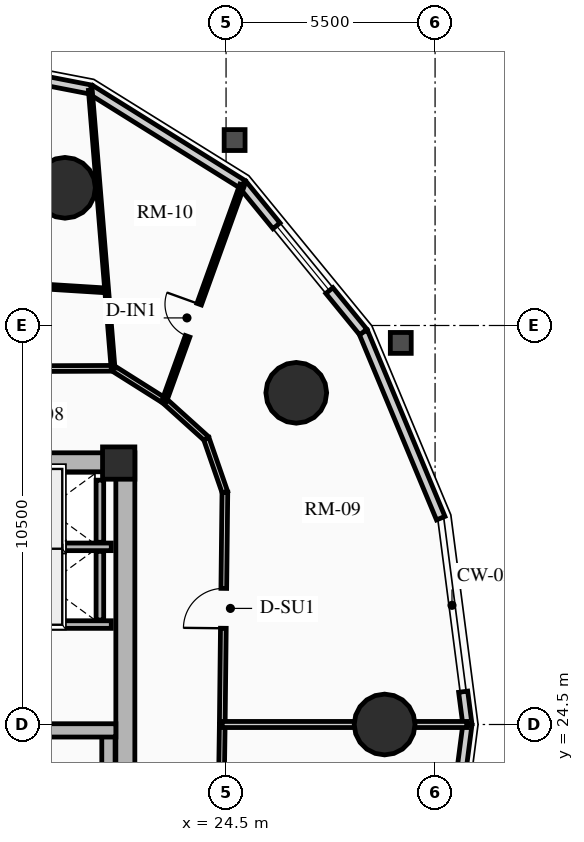
"""IFC4 building model, lengths in metres.
Left out: names, types, materials, properties, quantities, classifications, styles, units other than length and angle.
Written with IfcOpenShell. Run it as: python <this file> out.ifc"""

import sys

from ifc_helpers import new_model, si_unit, direction, frame, frame_2d, origin, origin_2d, place, context, subcontext, project, spatial, rectangle, circle, extrude, source, transform, mapped, element, fill, save


model = new_model("IFC4")
c1 = context("Model", 3, precision=1e-05, world=origin(), true_north=direction((0.0, 1.0)))
c2 = subcontext(c1, "Body", "Model", "MODEL_VIEW")
j1 = project(units=[si_unit("LENGTHUNIT", "METRE"), si_unit("PLANEANGLEUNIT", "RADIAN")], contexts=[c1])
p1 = place(None, origin())
s1 = spatial("IfcSite", under=j1, at=p1, CompositionType="ELEMENT")
p2 = place(p1, origin())
s2 = spatial("IfcBuilding", under=s1, at=p2, CompositionType="ELEMENT")
p3 = place(p2, frame((0.0, 0.0, 27.82)))
s3 = spatial("IfcBuildingStorey", under=s2, at=p3, CompositionType="ELEMENT", Elevation=27.82)
p4 = place(p3, frame((21.85, 17.35, 0.0), z_axis=(0.0, 0.0, 1.0), x_axis=(0.0, 1.0, 0.0)))
e1 = element("IfcWall", 1, at=p4, inside=s3, PredefinedType="SHEAR", context=c2, shape_type="SweptSolid", body=[
    extrude(rectangle(XDim=14.3, YDim=0.5, at=frame_2d((7.15, 0.0))), origin(), (0.0, 0.0, 1.0), 2.91),
])
p5 = place(p3, frame((11.15, 31.4, 0.0), z_axis=(0.0, 0.0, 1.0), x_axis=(1.0, 0.0, 0.0)))
e2 = element("IfcWall", 2, at=p5, inside=s3, PredefinedType="SHEAR", context=c2, shape_type="SweptSolid", body=[
    extrude(rectangle(XDim=10.7, YDim=0.5, at=frame_2d((5.35, 0.0))), origin(), (0.0, 0.0, 1.0), 2.91),
])
m1 = source(origin(), c2, "Body", "SweptSolid", [
    extrude(rectangle(XDim=1.5, YDim=2.02, at=frame_2d((0.75, 1.01))), frame((0.0, 0.26, 0.0), z_axis=(0.0, -1.0, 0.0), x_axis=(1.0, 0.0, 0.0)), (0.0, 0.0, 1.0), 0.52),
])
p6 = place(p5, frame((4.6, 0.0, 0.0)))
e3 = element("IfcOpeningElement", 3, at=p6, cuts=e2, PredefinedType="OPENING", context=c2, shape_type="MappedRepresentation", body=[
    mapped(m1, transform((0.0, 0.0, 0.0), x_axis=(1.0, 0.0, 0.0), y_axis=(0.0, 1.0, 0.0), z_axis=(0.0, 0.0, 1.0), scale=1.0)),
])
p7 = place(p3, frame((21.405, 17.6, 0.0), z_axis=(0.0, 0.0, 1.0), x_axis=(0.0, 1.0, 0.0)))
e4 = element("IfcWall", 4, at=p7, inside=s3, PredefinedType="SHEAR", context=c2, shape_type="SweptSolid", body=[
    extrude(rectangle(XDim=6.745, YDim=0.35, at=frame_2d((3.373, 0.0))), origin(), (0.0, 0.0, 1.0), 2.91),
])
p8 = place(p3, frame((18.315, 24.345, 0.0), z_axis=(0.0, 0.0, 1.0), x_axis=(1.0, 0.0, 0.0)))
e5 = element("IfcWall", 5, at=p8, inside=s3, PredefinedType="SHEAR", context=c2, shape_type="SweptSolid", body=[
    extrude(rectangle(XDim=3.285, YDim=0.35, at=frame_2d((1.643, 0.0))), origin(), (0.0, 0.0, 1.0), 2.91),
])
p9 = place(p3, frame((21.675, 31.38, 0.0), z_axis=(0.0, 0.0, 1.0), x_axis=(1.0, 0.0, 0.0)))
e6 = element("IfcColumn", 6, at=p9, inside=s3, PredefinedType="COLUMN", context=c2, shape_type="SweptSolid", body=[
    extrude(rectangle(XDim=0.85, YDim=0.85, at=origin_2d()), origin(), (0.0, 0.0, 1.0), 2.91),
])
for number, where, z_axis, x_axis in (
    (7, (28.672, 24.5, 0.0), (0.0, 0.0, 1.0), (1.0, 0.0, 0.0)),
    (8, (26.347, 33.229, 0.0), (0.0, 0.0, 1.0), (1.0, 0.0, 0.0)),
    (9, (20.261, 38.623, 0.0), (0.0, 0.0, 1.0), (1.0, 0.0, 0.0)),
):
    element("IfcColumn", number, at=place(p3, frame(where, z_axis=z_axis, x_axis=x_axis)), inside=s3, PredefinedType="USERDEFINED", context=c2, shape_type="SweptSolid", body=[
        extrude(circle(Radius=0.8, at=origin_2d()), origin(), (0.0, 0.0, 1.0), 2.91),
    ])
p10 = place(p3, frame((30.739, 25.363, 0.0), z_axis=(0.0, 0.0, 1.0), x_axis=(0.128523364007, -0.991706481225, 0.0)))
e10 = element("IfcWall", 10, at=p10, inside=s3, PredefinedType="SOLIDWALL", context=c2, shape_type="SweptSolid", body=[
    extrude(rectangle(XDim=0.87, YDim=0.24, at=frame_2d((0.435, 0.0))), origin(), (0.0, 0.0, 1.0), 2.073),
])
p11 = place(p3, frame((28.11, 34.827, 0.0), z_axis=(0.0, 0.0, 1.0), x_axis=(0.384255919668, -0.923226618009, 0.0)))
e11 = element("IfcWall", 11, at=p11, inside=s3, PredefinedType="SOLIDWALL", context=c2, shape_type="SweptSolid", body=[
    extrude(rectangle(XDim=5.305, YDim=0.24, at=frame_2d((2.653, 0.0))), origin(), (0.0, 0.0, 1.0), 2.635),
])
p12 = place(p3, frame((24.935, 38.714, 0.0), z_axis=(0.0, 0.0, 1.0), x_axis=(0.632588557044, -0.774488035735, 0.0)))
e12 = element("IfcWall", 12, at=p12, inside=s3, PredefinedType="SOLIDWALL", context=c2, shape_type="SweptSolid", body=[
    extrude(rectangle(XDim=5.019, YDim=0.24, at=frame_2d((2.509, 0.0))), origin(), (0.0, 0.0, 1.0), 2.635),
])
m2 = source(origin(), c2, "Body", "SweptSolid", [
    extrude(rectangle(XDim=2.2, YDim=1.35, at=frame_2d((1.1, 0.675))), frame((0.0, 0.13, 0.0), z_axis=(0.0, -1.0, 0.0), x_axis=(1.0, 0.0, 0.0)), (0.0, 0.0, 1.0), 0.26),
])
p13 = place(p12, frame((1.409, 0.0, 0.65)))
e13 = element("IfcOpeningElement", 13, at=p13, cuts=e12, PredefinedType="OPENING", context=c2, shape_type="MappedRepresentation", body=[
    mapped(m2, transform((0.0, 0.0, 0.0), x_axis=(1.0, 0.0, 0.0), y_axis=(0.0, 1.0, 0.0), z_axis=(0.0, 0.0, 1.0), scale=1.0)),
])
p14 = place(p3, frame((20.935, 41.21, 0.0), z_axis=(0.0, 0.0, 1.0), x_axis=(0.848422721916, -0.529319265601, 0.0)))
e14 = element("IfcWall", 14, at=p14, inside=s3, PredefinedType="SOLIDWALL", context=c2, shape_type="SweptSolid", body=[
    extrude(rectangle(XDim=4.715, YDim=0.24, at=frame_2d((2.357, 0.0))), origin(), (0.0, 0.0, 1.0), 2.635),
])
p15 = place(p3, frame((16.5, 42.07, 0.0), z_axis=(0.0, 0.0, 1.0), x_axis=(0.981717351035, -0.190344536766, 0.0)))
e15 = element("IfcWall", 15, at=p15, inside=s3, PredefinedType="SOLIDWALL", context=c2, shape_type="SweptSolid", body=[
    extrude(rectangle(XDim=4.517, YDim=0.24, at=frame_2d((2.259, 0.0))), origin(), (0.0, 0.0, 1.0), 2.635),
])
m3 = source(origin(), c2, "Body", "SweptSolid", [
    extrude(rectangle(XDim=1.9, YDim=1.35, at=frame_2d((0.95, 0.675))), frame((0.0, 0.13, 0.0), z_axis=(0.0, -1.0, 0.0), x_axis=(1.0, 0.0, 0.0)), (0.0, 0.0, 1.0), 0.26),
])
p16 = place(p15, frame((1.309, 0.0, 0.65)))
e16 = element("IfcOpeningElement", 16, at=p16, cuts=e15, PredefinedType="OPENING", context=c2, shape_type="MappedRepresentation", body=[
    mapped(m3, transform((0.0, 0.0, 0.0), x_axis=(1.0, 0.0, 0.0), y_axis=(0.0, 1.0, 0.0), z_axis=(0.0, 0.0, 1.0), scale=1.0)),
])
p17 = place(p3, frame((30.851, 24.5, 0.0), z_axis=(0.0, 0.0, 1.0), x_axis=(-0.128298189174, -0.991735637483, 0.0)))
e17 = element("IfcWall", 17, at=p17, inside=s3, PredefinedType="SOLIDWALL", context=c2, shape_type="SweptSolid", body=[
    extrude(rectangle(XDim=5.475, YDim=0.24, at=frame_2d((2.737, 0.0))), origin(), (0.0, 0.0, 1.0), 2.073),
])
p18 = place(p17, frame((1.787, 0.0, 0.65)))
e18 = element("IfcOpeningElement", 18, at=p18, cuts=e17, PredefinedType="OPENING", context=c2, shape_type="MappedRepresentation", body=[
    mapped(m3, transform((0.0, 0.0, 0.0), x_axis=(1.0, 0.0, 0.0), y_axis=(0.0, 1.0, 0.0), z_axis=(0.0, 0.0, 1.0), scale=1.0)),
])
for number, where, z_axis, x_axis in (
    (19, (18.51, 27.13, 0.0), (0.0, 0.0, 1.0), (1.0, 0.0, 0.0)),
    (20, (18.51, 29.175, 0.0), (0.0, 0.0, 1.0), (1.0, 0.0, 0.0)),
):
    element("IfcWall", number, at=place(p3, frame(where, z_axis=z_axis, x_axis=x_axis)), inside=s3, PredefinedType="SHEAR", context=c2, shape_type="SweptSolid", body=[
        extrude(rectangle(XDim=2.97, YDim=0.2, at=frame_2d((1.485, 0.0))), origin(), (0.0, 0.0, 1.0), 2.91),
    ])
p19 = place(p3, frame((21.18, 27.25, 0.0), z_axis=(0.0, 0.0, 1.0), x_axis=(0.0, 1.0, 0.0)))
e21 = element("IfcWall", 21, at=p19, inside=s3, PredefinedType="SHEAR", context=c2, shape_type="SweptSolid", body=[
    extrude(rectangle(XDim=1.805, YDim=0.2, at=frame_2d((0.902, 0.0))), origin(), (0.0, 0.0, 1.0), 2.91),
])
p20 = place(p3, frame((21.18, 29.295, 0.0), z_axis=(0.0, 0.0, 1.0), x_axis=(0.0, 1.0, 0.0)))
e22 = element("IfcWall", 22, at=p20, inside=s3, PredefinedType="SHEAR", context=c2, shape_type="SweptSolid", body=[
    extrude(rectangle(XDim=1.635, YDim=0.2, at=frame_2d((0.817, 0.0))), origin(), (0.0, 0.0, 1.0), 2.91),
])
p21 = place(p3, frame((24.4, 24.5, 0.0), z_axis=(0.0, 0.0, 1.0), x_axis=(0.011299841544, 0.999936154752, 0.0)))
e23 = element("IfcWall", 23, at=p21, inside=s3, PredefinedType="PARTITIONING", context=c2, shape_type="SweptSolid", body=[
    extrude(rectangle(XDim=6.115, YDim=0.15, at=frame_2d((3.057, 0.0))), origin(), (0.0, 0.0, 1.0), 2.159),
])
m4 = source(origin(), c2, "Body", "SweptSolid", [
    extrude(rectangle(XDim=1.05, YDim=2.015, at=frame_2d((0.525, 1.007))), frame((0.0, 0.085, 0.0), z_axis=(0.0, -1.0, 0.0), x_axis=(1.0, 0.0, 0.0)), (0.0, 0.0, 1.0), 0.17),
])
p22 = place(p21, frame((2.532, 0.0, 0.0)))
e24 = element("IfcOpeningElement", 24, at=p22, cuts=e23, PredefinedType="OPENING", context=c2, shape_type="MappedRepresentation", body=[
    mapped(m4, transform((0.0, 0.0, 0.0), x_axis=(1.0, 0.0, 0.0), y_axis=(0.0, 1.0, 0.0), z_axis=(0.0, 0.0, 1.0), scale=1.0)),
])
p23 = place(p3, frame((24.469, 30.614, 0.0), z_axis=(0.0, 0.0, 1.0), x_axis=(-0.327228335485, 0.944945298129, 0.0)))
e25 = element("IfcWall", 25, at=p23, inside=s3, PredefinedType="PARTITIONING", context=c2, shape_type="SweptSolid", body=[
    extrude(rectangle(XDim=1.495, YDim=0.15, at=frame_2d((0.748, 0.0))), origin(), (0.0, 0.0, 1.0), 2.205),
])
p24 = place(p3, frame((23.98, 32.027, 0.0), z_axis=(0.0, 0.0, 1.0), x_axis=(-0.742353224332, 0.670008724065, 0.0)))
e26 = element("IfcWall", 26, at=p24, inside=s3, PredefinedType="PARTITIONING", context=c2, shape_type="SweptSolid", body=[
    extrude(rectangle(XDim=1.485, YDim=0.15, at=frame_2d((0.742, 0.0))), origin(), (0.0, 0.0, 1.0), 2.159),
])
p25 = place(p3, frame((22.877, 33.022, 0.0), z_axis=(0.0, 0.0, 1.0), x_axis=(-0.845895608855, 0.533348496689, 0.0)))
e27 = element("IfcWall", 27, at=p25, inside=s3, PredefinedType="PARTITIONING", context=c2, shape_type="SweptSolid", body=[
    extrude(rectangle(XDim=1.597, YDim=0.15, at=frame_2d((0.798, 0.0))), origin(), (0.0, 0.0, 1.0), 2.205),
])
p26 = place(p3, frame((21.527, 33.873, 0.0), z_axis=(0.0, 0.0, 1.0), x_axis=(-0.999991838845, -0.004040079574, 0.0)))
e28 = element("IfcWall", 28, at=p26, inside=s3, PredefinedType="PARTITIONING", context=c2, shape_type="SweptSolid", body=[
    extrude(rectangle(XDim=3.384, YDim=0.15, at=frame_2d((1.692, 0.0))), origin(), (0.0, 0.0, 1.0), 2.159),
])
p27 = place(p3, frame((24.313, 18.496, 0.0), z_axis=(0.0, 0.0, 1.0), x_axis=(0.014394019188, 0.999896400739, 0.0)))
e29 = element("IfcWall", 29, at=p27, inside=s3, PredefinedType="PARTITIONING", context=c2, shape_type="SweptSolid", body=[
    extrude(rectangle(XDim=6.004, YDim=0.15, at=frame_2d((3.002, 0.0))), origin(), (0.0, 0.0, 1.0), 2.635),
])
p28 = place(p3, frame((24.4, 24.5, 0.0), z_axis=(0.0, 0.0, 1.0), x_axis=(1.0, 0.0, 0.0)))
e30 = element("IfcWall", 30, at=p28, inside=s3, PredefinedType="PARTITIONING", context=c2, shape_type="SweptSolid", body=[
    extrude(rectangle(XDim=6.431, YDim=0.16, at=frame_2d((3.216, 0.0))), origin(), (0.0, 0.0, 1.0), 2.073),
])
p29 = place(p3, frame((21.527, 33.873, 0.0), z_axis=(0.0, 0.0, 1.0), x_axis=(-0.081501553037, 0.996673214676, 0.0)))
e31 = element("IfcWall", 31, at=p29, inside=s3, PredefinedType="MOVABLE", context=c2, shape_type="SweptSolid", body=[
    extrude(rectangle(XDim=7.342, YDim=0.1, at=frame_2d((3.671, 0.0))), origin(), (0.0, 0.0, 1.0), 2.073),
])
p30 = place(p3, frame((22.877, 33.022, 0.0), z_axis=(0.0, 0.0, 1.0), x_axis=(0.339100549831, 0.94075013532, 0.0)))
e32 = element("IfcWall", 32, at=p30, inside=s3, PredefinedType="PARTITIONING", context=c2, shape_type="SweptSolid", body=[
    extrude(rectangle(XDim=6.034, YDim=0.125, at=frame_2d((3.017, 0.0))), origin(), (0.0, 0.0, 1.0), 2.073),
])
m5 = source(origin(), c2, "Body", "SweptSolid", [
    extrude(rectangle(XDim=0.9, YDim=2.005, at=frame_2d((0.45, 1.002))), frame((0.0, 0.073, 0.0), z_axis=(0.0, -1.0, 0.0), x_axis=(1.0, 0.0, 0.0)), (0.0, 0.0, 1.0), 0.145),
])
p31 = place(p30, frame((1.8, 0.0, 0.0)))
e33 = element("IfcOpeningElement", 33, at=p31, cuts=e32, PredefinedType="OPENING", context=c2, shape_type="MappedRepresentation", body=[
    mapped(m5, transform((0.0, 0.0, 0.0), x_axis=(1.0, 0.0, 0.0), y_axis=(0.0, 1.0, 0.0), z_axis=(0.0, 0.0, 1.0), scale=1.0)),
])
p32 = place(p3, frame((21.359, 35.922, 0.0), z_axis=(0.0, 0.0, 1.0), x_axis=(-0.998040956573, 0.062563959294, 0.0)))
e34 = element("IfcWall", 34, at=p32, inside=s3, PredefinedType="PARTITIONING", context=c2, shape_type="SweptSolid", body=[
    extrude(rectangle(XDim=3.684, YDim=0.125, at=frame_2d((1.842, 0.0))), origin(), (0.0, 0.0, 1.0), 2.159),
])
m6 = source(origin(), c2, "Body", "SweptSolid", [
    extrude(rectangle(XDim=2.2, YDim=1.35, at=frame_2d((1.1, 0.675))), frame((0.0, 0.03, 0.0), z_axis=(0.0, -1.0, 0.0), x_axis=(1.0, 0.0, 0.0)), (0.0, 0.0, 1.0), 0.06),
])
p33 = place(p13, origin())
e35 = element("IfcWindow", 35, at=p33, inside=s3, PartitioningType="DOUBLE_PANEL_VERTICAL", PredefinedType="WINDOW", context=c2, shape_type="MappedRepresentation", body=[
    mapped(m6, transform((0.0, 0.0, 0.0), x_axis=(1.0, 0.0, 0.0), y_axis=(0.0, 1.0, 0.0), z_axis=(0.0, 0.0, 1.0), scale=1.0)),
])
fill(e13, e35)
m7 = source(origin(), c2, "Body", "SweptSolid", [
    extrude(rectangle(XDim=1.05, YDim=2.015, at=frame_2d((0.525, 1.007))), frame((0.0, 0.025, 0.0), z_axis=(0.0, -1.0, 0.0), x_axis=(1.0, 0.0, 0.0)), (0.0, 0.0, 1.0), 0.05),
])
p34 = place(p22, origin())
e36 = element("IfcDoor", 36, at=p34, inside=s3, OperationType="SINGLE_SWING_LEFT", PredefinedType="DOOR", context=c2, shape_type="MappedRepresentation", body=[
    mapped(m7, transform((0.0, 0.0, 0.0), x_axis=(1.0, 0.0, 0.0), y_axis=(0.0, 1.0, 0.0), z_axis=(0.0, 0.0, 1.0), scale=1.0)),
])
fill(e24, e36)
m8 = source(origin(), c2, "Body", "SweptSolid", [
    extrude(rectangle(XDim=0.9, YDim=2.005, at=frame_2d((0.45, 1.002))), frame((0.0, 0.025, 0.0), z_axis=(0.0, -1.0, 0.0), x_axis=(1.0, 0.0, 0.0)), (0.0, 0.0, 1.0), 0.05),
])
p35 = place(p31, origin())
e37 = element("IfcDoor", 37, at=p35, inside=s3, OperationType="SINGLE_SWING_RIGHT", PredefinedType="DOOR", context=c2, shape_type="MappedRepresentation", body=[
    mapped(m8, transform((0.0, 0.0, 0.0), x_axis=(1.0, 0.0, 0.0), y_axis=(0.0, 1.0, 0.0), z_axis=(0.0, 0.0, 1.0), scale=1.0)),
])
fill(e33, e37)
save(model, sys.argv[1])
